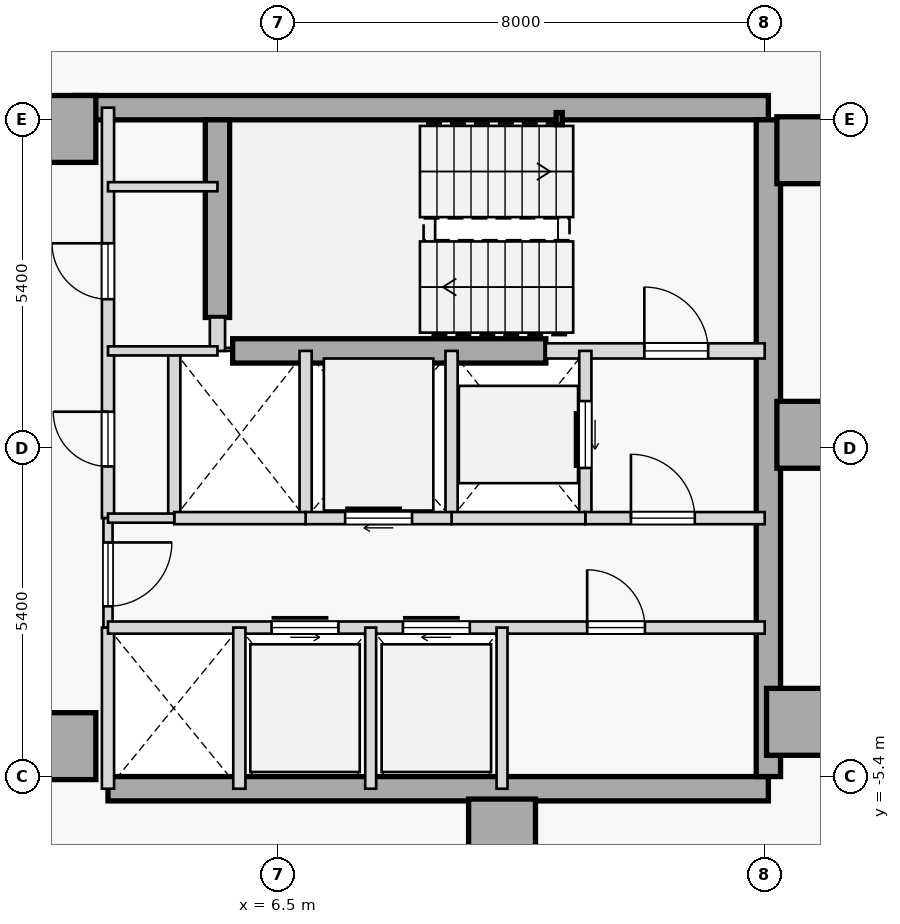
"""IFC4 building model, lengths in metres.
Left out: names, types, materials, properties, quantities, classifications, styles, units other than length and angle.
Written with IfcOpenShell. Run it as: python <this file> out.ifc"""

import sys

from ifc_helpers import new_model, si_unit, direction, frame, frame_2d, origin, origin_2d, place, context, subcontext, project, spatial, rectangle, hollow_rectangle, extrude, element, fill, save


model = new_model("IFC4")
c1 = context("Model", 3, precision=1e-05, world=origin(), true_north=direction((0.0, 1.0)))
c2 = subcontext(c1, "Body", "Model", "MODEL_VIEW")
j1 = project(units=[si_unit("LENGTHUNIT", "METRE"), si_unit("PLANEANGLEUNIT", "RADIAN")], contexts=[c1])
p1 = place(None, origin())
s1 = spatial("IfcSite", under=j1, at=p1, CompositionType="ELEMENT")
p2 = place(p1, origin())
s2 = spatial("IfcBuilding", under=s1, at=p2, CompositionType="ELEMENT")
p3 = place(p2, frame((0.0, 0.0, 165.0)))
s3 = spatial("IfcBuildingStorey", under=s2, at=p3, CompositionType="ELEMENT", Elevation=165.0)
for number, where, z_axis, x_axis in (
    (1, (15.25, 4.9, 0.0), (0.0, 0.0, 1.0), (1.0, 0.0, 0.0)),
    (2, (15.25, 0.22, 0.0), (0.0, 0.0, 1.0), (1.0, 0.0, 0.0)),
    (3, (15.08, -4.5, 0.0), (0.0, 0.0, 1.0), (1.0, 0.0, 0.0)),
    (4, (10.18, -6.32, 0.0), (0.0, 0.0, 1.0), (1.0, 0.0, 0.0)),
    (5, (2.95, -4.9, 0.0), (0.0, 0.0, 1.0), (1.0, 0.0, 0.0)),
    (6, (2.95, 5.25, 0.0), (0.0, 0.0, 1.0), (1.0, 0.0, 0.0)),
):
    element("IfcColumn", number, at=place(p3, frame(where, z_axis=z_axis, x_axis=x_axis)), inside=s3, PredefinedType="COLUMN", context=c2, shape_type="SweptSolid", body=[
        extrude(rectangle(XDim=1.1, YDim=1.1, at=origin_2d()), origin(), (0.0, 0.0, 1.0), 3.4),
    ])
p4 = place(p3, frame((3.15, 5.6, 0.0), z_axis=(0.0, 0.0, 1.0), x_axis=(1.0, 0.0, 0.0)))
e7 = element("IfcWall", 7, at=p4, inside=s3, PredefinedType="SHEAR", context=c2, shape_type="SweptSolid", body=[
    extrude(rectangle(XDim=11.41, YDim=0.4, at=frame_2d((5.705, 0.0))), origin(), (0.0, 0.0, 1.0), 3.175),
])
p5 = place(p3, frame((3.7, -5.6, 0.0), z_axis=(0.0, 0.0, 1.0), x_axis=(1.0, 0.0, 0.0)))
e8 = element("IfcWall", 8, at=p5, inside=s3, PredefinedType="SHEAR", context=c2, shape_type="SweptSolid", body=[
    extrude(rectangle(XDim=10.86, YDim=0.4, at=frame_2d((5.43, 0.0))), origin(), (0.0, 0.0, 1.0), 3.175),
])
p6 = place(p3, frame((14.56, -5.4, 0.0), z_axis=(0.0, 0.0, 1.0), x_axis=(0.0, 1.0, 0.0)))
e9 = element("IfcWall", 9, at=p6, inside=s3, PredefinedType="SHEAR", context=c2, shape_type="SweptSolid", body=[
    extrude(rectangle(XDim=10.8, YDim=0.4, at=frame_2d((5.4, 0.0))), origin(), (0.0, 0.0, 1.0), 3.175),
])
p7 = place(p3, frame((5.5, 2.15, 0.0), z_axis=(0.0, 0.0, 1.0), x_axis=(0.0, 1.0, 0.0)))
e10 = element("IfcWall", 10, at=p7, inside=s3, PredefinedType="SHEAR", context=c2, shape_type="SweptSolid", body=[
    extrude(rectangle(XDim=3.25, YDim=0.4, at=frame_2d((1.625, 0.0))), origin(), (0.0, 0.0, 1.0), 3.175),
])
p8 = place(p3, frame((5.75, 1.6, 0.0), z_axis=(0.0, 0.0, 1.0), x_axis=(1.0, 0.0, 0.0)))
e11 = element("IfcWall", 11, at=p8, inside=s3, PredefinedType="SHEAR", context=c2, shape_type="SweptSolid", body=[
    extrude(rectangle(XDim=5.15, YDim=0.4, at=frame_2d((2.575, 0.0))), origin(), (0.0, 0.0, 1.0), 3.175),
])
p9 = place(p3, frame((11.12, 5.42, 0.0), z_axis=(0.0, 0.0, 1.0), x_axis=(1.0, 0.0, 0.0)))
e12 = element("IfcColumn", 12, at=p9, inside=s3, PredefinedType="COLUMN", context=c2, shape_type="SweptSolid", body=[
    extrude(hollow_rectangle(XDim=0.1, YDim=0.2, WallThickness=0.008, at=origin_2d()), origin(), (0.0, 0.0, 1.0), 3.4),
])
p10 = place(p3, frame((10.9, 1.6, 0.0), z_axis=(0.0, 0.0, 1.0), x_axis=(1.0, 0.0, 0.0)))
e13 = element("IfcWall", 13, at=p10, inside=s3, PredefinedType="STANDARD", context=c2, shape_type="SweptSolid", body=[
    extrude(rectangle(XDim=3.6, YDim=0.25, at=frame_2d((1.8, 0.0))), origin(), (0.0, 0.0, 1.0), 3.175),
])
p11 = place(p10, frame((1.62, 0.0, 0.0)))
e14 = element("IfcOpeningElement", 14, at=p11, cuts=e13, PredefinedType="OPENING", context=c2, shape_type="SweptSolid", body=[
    extrude(rectangle(XDim=1.05, YDim=2.15, at=frame_2d((0.525, 1.075))), frame((0.0, 0.135, 0.0), z_axis=(0.0, -1.0, 0.0), x_axis=(1.0, 0.0, 0.0)), (0.0, 0.0, 1.0), 0.27),
])
p12 = place(p3, frame((5.5, 1.6, 0.0), z_axis=(0.0, 0.0, 1.0), x_axis=(0.0, 1.0, 0.0)))
e15 = element("IfcWall", 15, at=p12, inside=s3, PredefinedType="STANDARD", context=c2, shape_type="SweptSolid", body=[
    extrude(rectangle(XDim=0.55, YDim=0.25, at=frame_2d((0.275, 0.0))), origin(), (0.0, 0.0, 1.0), 3.175),
])
p13 = place(p3, frame((3.7, -1.15, 0.0), z_axis=(0.0, 0.0, 1.0), x_axis=(0.0, 1.0, 0.0)))
e16 = element("IfcWall", 16, at=p13, inside=s3, PredefinedType="STANDARD", context=c2, shape_type="SweptSolid", body=[
    extrude(rectangle(XDim=6.75, YDim=0.2, at=frame_2d((3.375, 0.0))), origin(), (0.0, 0.0, 1.0), 3.175),
])
p14 = place(p13, frame((3.6, 0.0, 0.0)))
e17 = element("IfcOpeningElement", 17, at=p14, cuts=e16, PredefinedType="OPENING", context=c2, shape_type="SweptSolid", body=[
    extrude(rectangle(XDim=0.92, YDim=2.15, at=frame_2d((0.46, 1.075))), frame((0.0, 0.11, 0.0), z_axis=(0.0, -1.0, 0.0), x_axis=(1.0, 0.0, 0.0)), (0.0, 0.0, 1.0), 0.22),
])
p15 = place(p13, frame((0.85, 0.0, 0.0)))
e18 = element("IfcOpeningElement", 18, at=p15, cuts=e16, PredefinedType="OPENING", context=c2, shape_type="SweptSolid", body=[
    extrude(rectangle(XDim=0.9, YDim=2.15, at=frame_2d((0.45, 1.075))), frame((0.0, 0.11, 0.0), z_axis=(0.0, -1.0, 0.0), x_axis=(1.0, 0.0, 0.0)), (0.0, 0.0, 1.0), 0.22),
])
p16 = place(p3, frame((3.7, -2.95, 0.0), z_axis=(0.0, 0.0, 1.0), x_axis=(0.0, 1.0, 0.0)))
e19 = element("IfcWall", 19, at=p16, inside=s3, PredefinedType="PARTITIONING", context=c2, shape_type="SweptSolid", body=[
    extrude(rectangle(XDim=1.8, YDim=0.15, at=frame_2d((0.9, 0.0))), origin(), (0.0, 0.0, 1.0), 3.175),
])
p17 = place(p16, frame((0.35, 0.0, 0.0)))
e20 = element("IfcOpeningElement", 20, at=p17, cuts=e19, PredefinedType="OPENING", context=c2, shape_type="SweptSolid", body=[
    extrude(rectangle(XDim=1.05, YDim=2.18, at=frame_2d((0.525, 1.09))), frame((0.0, 0.085, 0.0), z_axis=(0.0, -1.0, 0.0), x_axis=(1.0, 0.0, 0.0)), (0.0, 0.0, 1.0), 0.17),
])
p18 = place(p3, frame((3.7, -5.6, 0.0), z_axis=(0.0, 0.0, 1.0), x_axis=(0.0, 1.0, 0.0)))
e21 = element("IfcWall", 21, at=p18, inside=s3, PredefinedType="STANDARD", context=c2, shape_type="SweptSolid", body=[
    extrude(rectangle(XDim=2.65, YDim=0.2, at=frame_2d((1.325, 0.0))), origin(), (0.0, 0.0, 1.0), 3.175),
])
p19 = place(p3, frame((11.55, -1.15, 0.0), z_axis=(0.0, 0.0, 1.0), x_axis=(0.0, 1.0, 0.0)))
e22 = element("IfcWall", 22, at=p19, inside=s3, PredefinedType="STANDARD", context=c2, shape_type="SweptSolid", body=[
    extrude(rectangle(XDim=2.75, YDim=0.2, at=frame_2d((1.375, 0.0))), origin(), (0.0, 0.0, 1.0), 3.175),
])
p20 = place(p19, frame((0.825, 0.0, 0.0)))
e23 = element("IfcOpeningElement", 23, at=p20, cuts=e22, PredefinedType="OPENING", context=c2, shape_type="SweptSolid", body=[
    extrude(rectangle(XDim=1.1, YDim=2.15, at=frame_2d((0.55, 1.075))), frame((0.0, 0.11, 0.0), z_axis=(0.0, -1.0, 0.0), x_axis=(1.0, 0.0, 0.0)), (0.0, 0.0, 1.0), 0.22),
])
p21 = place(p3, frame((9.35, -1.15, 0.0), z_axis=(0.0, 0.0, 1.0), x_axis=(0.0, 1.0, 0.0)))
e24 = element("IfcWall", 24, at=p21, inside=s3, PredefinedType="STANDARD", context=c2, shape_type="SweptSolid", body=[
    extrude(rectangle(XDim=2.75, YDim=0.2, at=frame_2d((1.375, 0.0))), origin(), (0.0, 0.0, 1.0), 3.175),
])
p22 = place(p3, frame((11.55, -1.15, 0.0), z_axis=(0.0, 0.0, 1.0), x_axis=(1.0, 0.0, 0.0)))
e25 = element("IfcWall", 25, at=p22, inside=s3, PredefinedType="STANDARD", context=c2, shape_type="SweptSolid", body=[
    extrude(rectangle(XDim=2.95, YDim=0.2, at=frame_2d((1.475, 0.0))), origin(), (0.0, 0.0, 1.0), 3.175),
])
p23 = place(p22, frame((0.75, 0.0, 0.0)))
e26 = element("IfcOpeningElement", 26, at=p23, cuts=e25, PredefinedType="OPENING", context=c2, shape_type="SweptSolid", body=[
    extrude(rectangle(XDim=1.05, YDim=2.18, at=frame_2d((0.525, 1.09))), frame((0.0, 0.11, 0.0), z_axis=(0.0, -1.0, 0.0), x_axis=(1.0, 0.0, 0.0)), (0.0, 0.0, 1.0), 0.22),
])
p24 = place(p3, frame((9.35, -1.15, 0.0), z_axis=(0.0, 0.0, 1.0), x_axis=(1.0, 0.0, 0.0)))
e27 = element("IfcWall", 27, at=p24, inside=s3, PredefinedType="STANDARD", context=c2, shape_type="SweptSolid", body=[
    extrude(rectangle(XDim=2.2, YDim=0.2, at=frame_2d((1.1, 0.0))), origin(), (0.0, 0.0, 1.0), 3.175),
])
p25 = place(p3, frame((6.95, -1.15, 0.0), z_axis=(0.0, 0.0, 1.0), x_axis=(0.0, 1.0, 0.0)))
e28 = element("IfcWall", 28, at=p25, inside=s3, PredefinedType="STANDARD", context=c2, shape_type="SweptSolid", body=[
    extrude(rectangle(XDim=2.75, YDim=0.2, at=frame_2d((1.375, 0.0))), origin(), (0.0, 0.0, 1.0), 3.175),
])
p26 = place(p3, frame((6.95, -1.15, 0.0), z_axis=(0.0, 0.0, 1.0), x_axis=(1.0, 0.0, 0.0)))
e29 = element("IfcWall", 29, at=p26, inside=s3, PredefinedType="STANDARD", context=c2, shape_type="SweptSolid", body=[
    extrude(rectangle(XDim=2.4, YDim=0.2, at=frame_2d((1.2, 0.0))), origin(), (0.0, 0.0, 1.0), 3.175),
])
p27 = place(p26, frame((0.65, 0.0, 0.0)))
e30 = element("IfcOpeningElement", 30, at=p27, cuts=e29, PredefinedType="OPENING", context=c2, shape_type="SweptSolid", body=[
    extrude(rectangle(XDim=1.1, YDim=2.15, at=frame_2d((0.55, 1.075))), frame((0.0, 0.11, 0.0), z_axis=(0.0, -1.0, 0.0), x_axis=(1.0, 0.0, 0.0)), (0.0, 0.0, 1.0), 0.22),
])
p28 = place(p3, frame((4.79, -1.15, 0.0), z_axis=(0.0, 0.0, 1.0), x_axis=(0.0, 1.0, 0.0)))
e31 = element("IfcWall", 31, at=p28, inside=s3, PredefinedType="STANDARD", context=c2, shape_type="SweptSolid", body=[
    extrude(rectangle(XDim=2.75, YDim=0.2, at=frame_2d((1.375, 0.0))), origin(), (0.0, 0.0, 1.0), 3.175),
])
p29 = place(p3, frame((4.79, -1.15, 0.0), z_axis=(0.0, 0.0, 1.0), x_axis=(1.0, 0.0, 0.0)))
e32 = element("IfcWall", 32, at=p29, inside=s3, PredefinedType="STANDARD", context=c2, shape_type="SweptSolid", body=[
    extrude(rectangle(XDim=2.16, YDim=0.2, at=frame_2d((1.08, 0.0))), origin(), (0.0, 0.0, 1.0), 3.175),
])
p30 = place(p3, frame((3.7, -1.15, 0.0), z_axis=(0.0, 0.0, 1.0), x_axis=(1.0, 0.0, 0.0)))
e33 = element("IfcWall", 33, at=p30, inside=s3, PredefinedType="PARTITIONING", context=c2, shape_type="SweptSolid", body=[
    extrude(rectangle(XDim=1.09, YDim=0.15, at=frame_2d((0.545, 0.0))), origin(), (0.0, 0.0, 1.0), 3.175),
])
p31 = place(p3, frame((3.7, -2.95, 0.0), z_axis=(0.0, 0.0, 1.0), x_axis=(1.0, 0.0, 0.0)))
e34 = element("IfcWall", 34, at=p31, inside=s3, PredefinedType="STANDARD", context=c2, shape_type="SweptSolid", body=[
    extrude(rectangle(XDim=10.8, YDim=0.2, at=frame_2d((5.4, 0.0))), origin(), (0.0, 0.0, 1.0), 3.175),
])
p32 = place(p31, frame((2.69, 0.0, 0.0)))
e35 = element("IfcOpeningElement", 35, at=p32, cuts=e34, PredefinedType="OPENING", context=c2, shape_type="SweptSolid", body=[
    extrude(rectangle(XDim=1.1, YDim=2.15, at=frame_2d((0.55, 1.075))), frame((0.0, 0.11, 0.0), z_axis=(0.0, -1.0, 0.0), x_axis=(1.0, 0.0, 0.0)), (0.0, 0.0, 1.0), 0.22),
])
p33 = place(p31, frame((4.85, 0.0, 0.0)))
e36 = element("IfcOpeningElement", 36, at=p33, cuts=e34, PredefinedType="OPENING", context=c2, shape_type="SweptSolid", body=[
    extrude(rectangle(XDim=1.1, YDim=2.15, at=frame_2d((0.55, 1.075))), frame((0.0, 0.11, 0.0), z_axis=(0.0, -1.0, 0.0), x_axis=(1.0, 0.0, 0.0)), (0.0, 0.0, 1.0), 0.22),
])
p34 = place(p31, frame((7.88, 0.0, 0.0)))
e37 = element("IfcOpeningElement", 37, at=p34, cuts=e34, PredefinedType="OPENING", context=c2, shape_type="SweptSolid", body=[
    extrude(rectangle(XDim=0.95, YDim=2.15, at=frame_2d((0.475, 1.075))), frame((0.0, 0.11, 0.0), z_axis=(0.0, -1.0, 0.0), x_axis=(1.0, 0.0, 0.0)), (0.0, 0.0, 1.0), 0.22),
])
p35 = place(p3, frame((5.86, -5.6, 0.0), z_axis=(0.0, 0.0, 1.0), x_axis=(0.0, 1.0, 0.0)))
e38 = element("IfcWall", 38, at=p35, inside=s3, PredefinedType="STANDARD", context=c2, shape_type="SweptSolid", body=[
    extrude(rectangle(XDim=2.65, YDim=0.2, at=frame_2d((1.325, 0.0))), origin(), (0.0, 0.0, 1.0), 3.175),
])
for number, where, z_axis, x_axis in (
    (39, (10.18, -5.6, 0.0), (0.0, 0.0, 1.0), (0.0, 1.0, 0.0)),
    (40, (8.02, -5.6, 0.0), (0.0, 0.0, 1.0), (0.0, 1.0, 0.0)),
):
    element("IfcWall", number, at=place(p3, frame(where, z_axis=z_axis, x_axis=x_axis)), inside=s3, PredefinedType="STANDARD", context=c2, shape_type="SweptSolid", body=[
        extrude(rectangle(XDim=2.65, YDim=0.18, at=frame_2d((1.325, 0.0))), origin(), (0.0, 0.0, 1.0), 3.175),
    ])
for number, where, z_axis, x_axis in (
    (41, (3.7, 4.3, 0.0), (0.0, 0.0, 1.0), (1.0, 0.0, 0.0)),
    (42, (3.7, 1.6, 0.0), (0.0, 0.0, 1.0), (1.0, 0.0, 0.0)),
):
    element("IfcWall", number, at=place(p3, frame(where, z_axis=z_axis, x_axis=x_axis)), inside=s3, PredefinedType="PARTITIONING", context=c2, shape_type="SweptSolid", body=[
        extrude(rectangle(XDim=1.8, YDim=0.15, at=frame_2d((0.9, 0.0))), origin(), (0.0, 0.0, 1.0), 3.175),
    ])
p36 = place(p11, origin())
e43 = element("IfcDoor", 43, at=p36, inside=s3, OperationType="SINGLE_SWING_LEFT", PredefinedType="DOOR", context=c2, shape_type="SweptSolid", body=[
    extrude(rectangle(XDim=1.05, YDim=2.15, at=frame_2d((0.525, 1.075))), frame((0.0, 0.025, 0.0), z_axis=(0.0, -1.0, 0.0), x_axis=(1.0, 0.0, 0.0)), (0.0, 0.0, 1.0), 0.05),
])
fill(e14, e43)
p37 = place(p23, origin())
e44 = element("IfcDoor", 44, at=p37, inside=s3, OperationType="SINGLE_SWING_LEFT", PredefinedType="DOOR", context=c2, shape_type="SweptSolid", body=[
    extrude(rectangle(XDim=1.05, YDim=2.18, at=frame_2d((0.525, 1.09))), frame((0.0, 0.025, 0.0), z_axis=(0.0, -1.0, 0.0), x_axis=(1.0, 0.0, 0.0)), (0.0, 0.0, 1.0), 0.05),
])
fill(e26, e44)
p38 = place(p17, frame((1.05, 0.0, 0.0), z_axis=(0.0, 0.0, 1.0), x_axis=(-1.0, 0.0, 0.0)))
e45 = element("IfcDoor", 45, at=p38, inside=s3, OperationType="SINGLE_SWING_RIGHT", PredefinedType="DOOR", context=c2, shape_type="SweptSolid", body=[
    extrude(rectangle(XDim=1.05, YDim=2.18, at=frame_2d((0.525, 1.09))), frame((0.0, 0.025, 0.0), z_axis=(0.0, -1.0, 0.0), x_axis=(1.0, 0.0, 0.0)), (0.0, 0.0, 1.0), 0.05),
])
fill(e20, e45)
p39 = place(p20, origin())
e46 = element("IfcDoor", 46, at=p39, inside=s3, OperationType="SLIDING_TO_RIGHT", PredefinedType="DOOR", context=c2, shape_type="SweptSolid", body=[
    extrude(rectangle(XDim=1.1, YDim=2.15, at=frame_2d((0.55, 1.075))), frame((0.0, 0.025, 0.0), z_axis=(0.0, -1.0, 0.0), x_axis=(1.0, 0.0, 0.0)), (0.0, 0.0, 1.0), 0.05),
])
fill(e23, e46)
p40 = place(p27, origin())
e47 = element("IfcDoor", 47, at=p40, inside=s3, OperationType="SLIDING_TO_RIGHT", PredefinedType="DOOR", context=c2, shape_type="SweptSolid", body=[
    extrude(rectangle(XDim=1.1, YDim=2.15, at=frame_2d((0.55, 1.075))), frame((0.0, 0.025, 0.0), z_axis=(0.0, -1.0, 0.0), x_axis=(1.0, 0.0, 0.0)), (0.0, 0.0, 1.0), 0.05),
])
fill(e30, e47)
p41 = place(p32, origin())
e48 = element("IfcDoor", 48, at=p41, inside=s3, OperationType="SLIDING_TO_LEFT", PredefinedType="DOOR", context=c2, shape_type="SweptSolid", body=[
    extrude(rectangle(XDim=1.1, YDim=2.15, at=frame_2d((0.55, 1.075))), frame((0.0, 0.025, 0.0), z_axis=(0.0, -1.0, 0.0), x_axis=(1.0, 0.0, 0.0)), (0.0, 0.0, 1.0), 0.05),
])
fill(e35, e48)
p42 = place(p33, origin())
e49 = element("IfcDoor", 49, at=p42, inside=s3, OperationType="SLIDING_TO_RIGHT", PredefinedType="DOOR", context=c2, shape_type="SweptSolid", body=[
    extrude(rectangle(XDim=1.1, YDim=2.15, at=frame_2d((0.55, 1.075))), frame((0.0, 0.025, 0.0), z_axis=(0.0, -1.0, 0.0), x_axis=(1.0, 0.0, 0.0)), (0.0, 0.0, 1.0), 0.05),
])
fill(e36, e49)
p43 = place(p34, origin())
e50 = element("IfcDoor", 50, at=p43, inside=s3, OperationType="SINGLE_SWING_LEFT", PredefinedType="DOOR", context=c2, shape_type="SweptSolid", body=[
    extrude(rectangle(XDim=0.95, YDim=2.15, at=frame_2d((0.475, 1.075))), frame((0.0, 0.025, 0.0), z_axis=(0.0, -1.0, 0.0), x_axis=(1.0, 0.0, 0.0)), (0.0, 0.0, 1.0), 0.05),
])
fill(e37, e50)
p44 = place(p14, origin())
e51 = element("IfcDoor", 51, at=p44, inside=s3, OperationType="SINGLE_SWING_RIGHT", PredefinedType="DOOR", context=c2, shape_type="SweptSolid", body=[
    extrude(rectangle(XDim=0.92, YDim=2.15, at=frame_2d((0.46, 1.075))), frame((0.0, 0.025, 0.0), z_axis=(0.0, -1.0, 0.0), x_axis=(1.0, 0.0, 0.0)), (0.0, 0.0, 1.0), 0.05),
])
fill(e17, e51)
p45 = place(p15, origin())
e52 = element("IfcDoor", 52, at=p45, inside=s3, OperationType="SINGLE_SWING_RIGHT", PredefinedType="DOOR", context=c2, shape_type="SweptSolid", body=[
    extrude(rectangle(XDim=0.9, YDim=2.15, at=frame_2d((0.45, 1.075))), frame((0.0, 0.025, 0.0), z_axis=(0.0, -1.0, 0.0), x_axis=(1.0, 0.0, 0.0)), (0.0, 0.0, 1.0), 0.05),
])
fill(e18, e52)
save(model, sys.argv[1])
